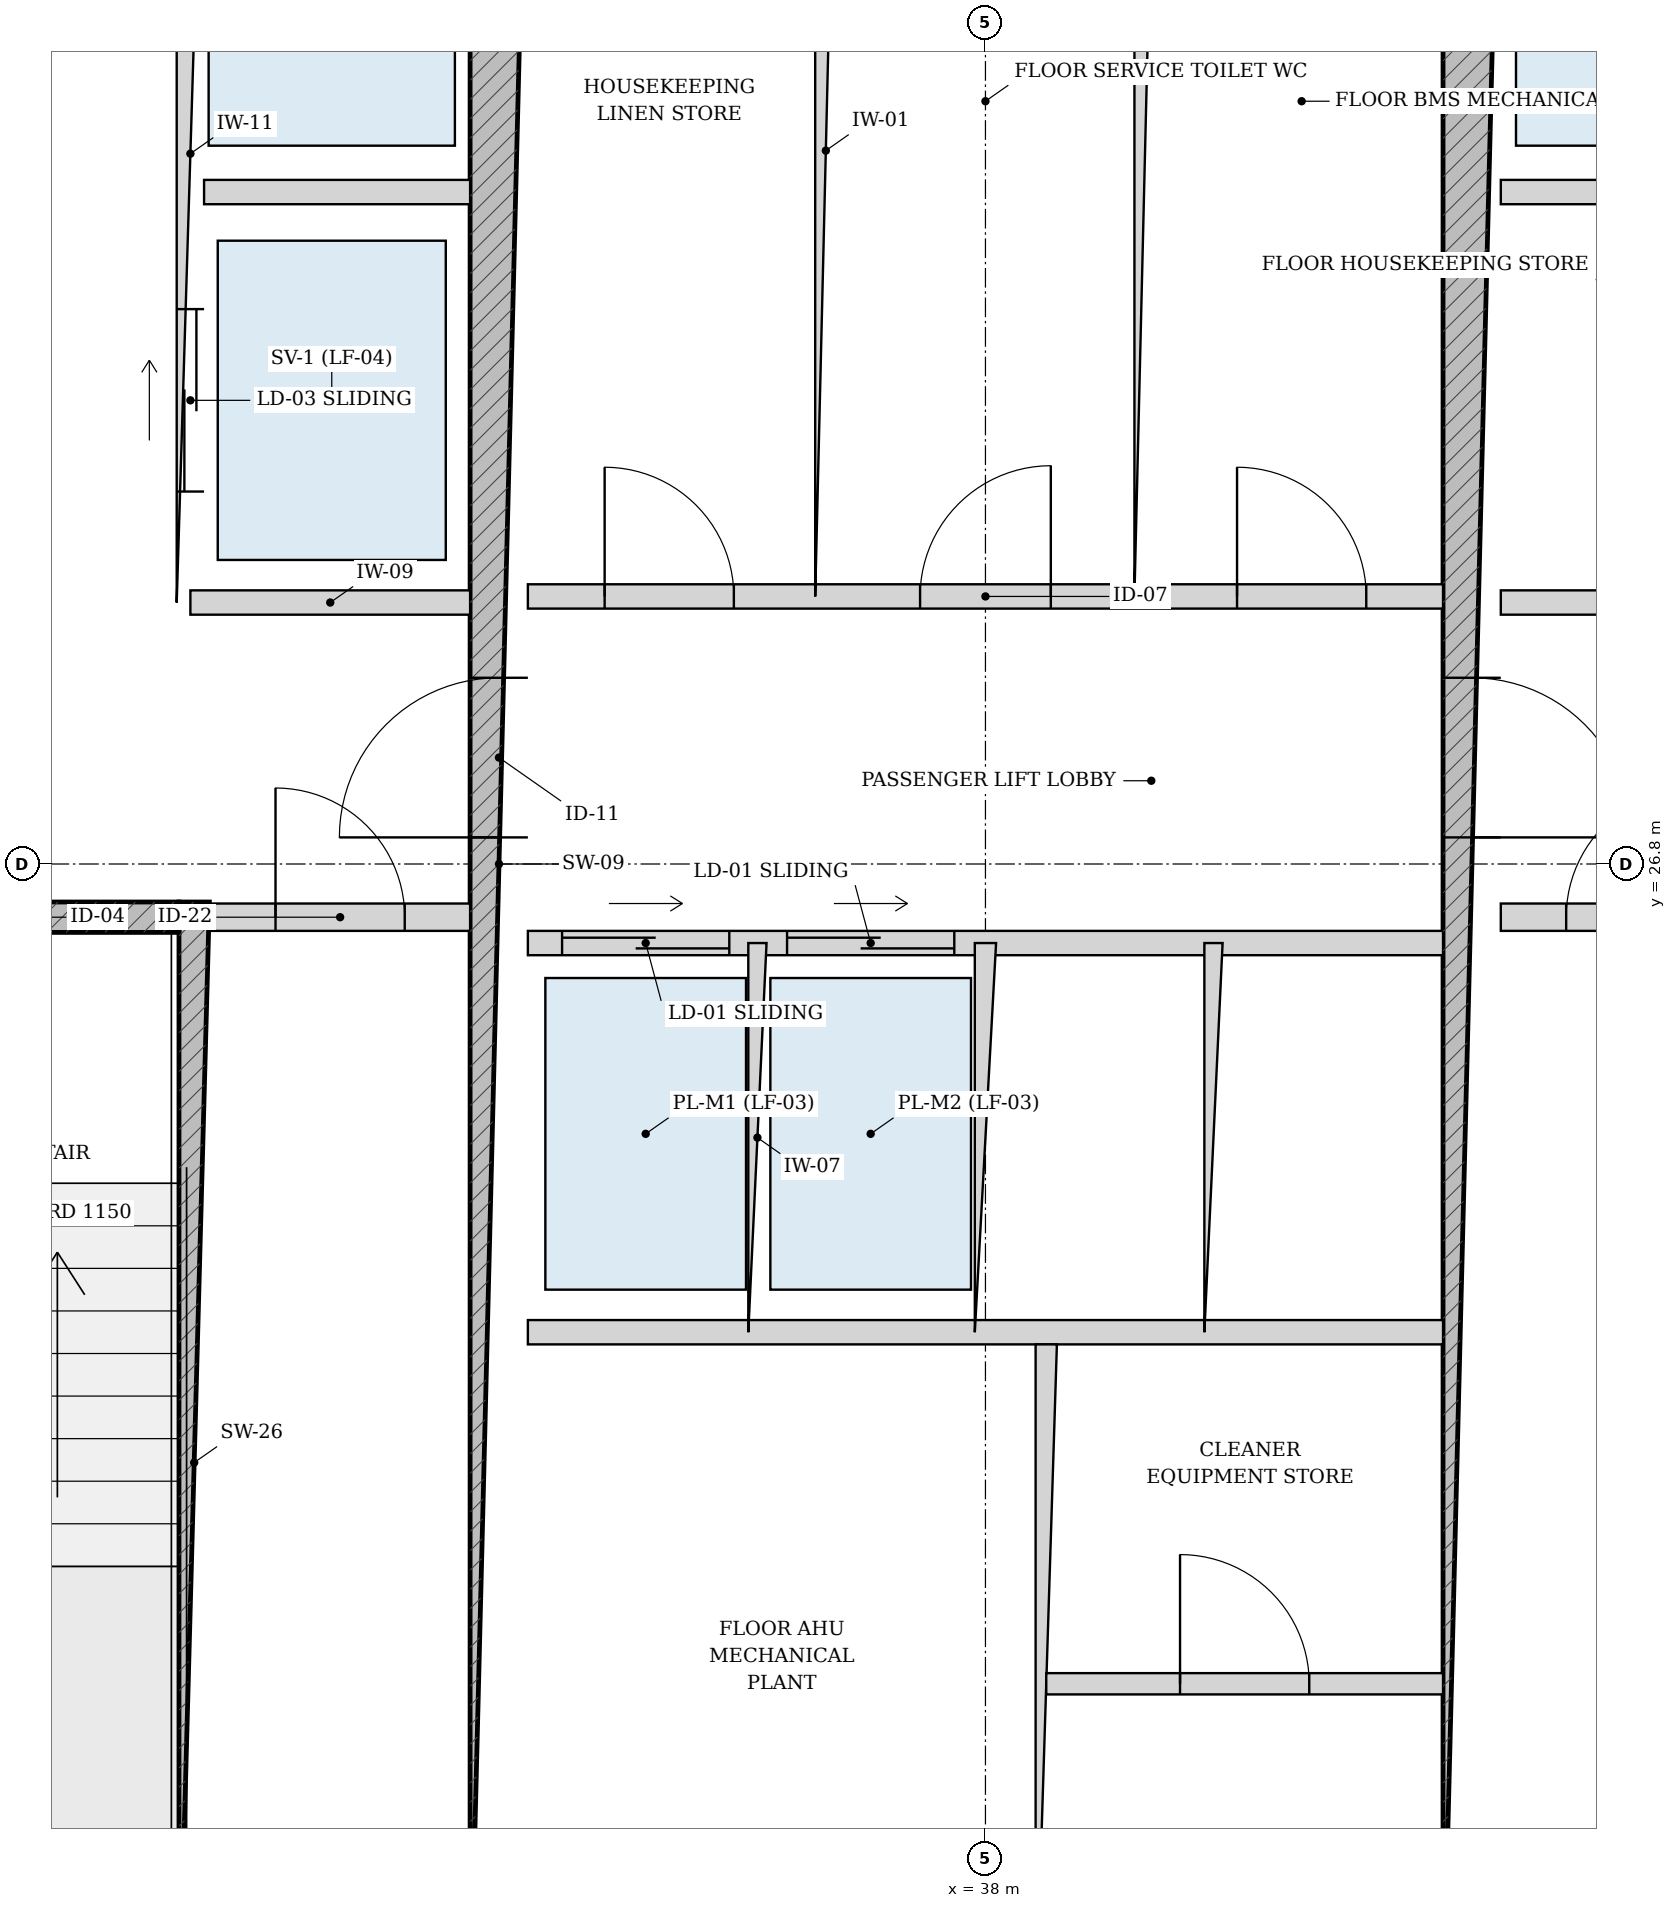
"""IFC4 building model, lengths in metres.
Left out: names, types, materials, properties, quantities, classifications, styles, units other than length and angle.
Written with IfcOpenShell. Run it as: python <this file> out.ifc"""

import sys

from ifc_helpers import new_model, si_unit, direction, frame, frame_2d, origin, place, context, subcontext, project, spatial, rectangle, extrude, source, transform, mapped, element, fill, save


model = new_model("IFC4")
c1 = context("Model", 3, precision=1e-05, world=origin(), true_north=direction((-0.2419218956, 0.970295726276)))
c2 = subcontext(c1, "Body", "Model", "MODEL_VIEW")
j1 = project(units=[si_unit("LENGTHUNIT", "METRE"), si_unit("PLANEANGLEUNIT", "RADIAN")], contexts=[c1])
p1 = place(None, origin())
s1 = spatial("IfcSite", under=j1, at=p1, CompositionType="ELEMENT")
p2 = place(p1, origin())
s2 = spatial("IfcBuilding", under=s1, at=p2, CompositionType="ELEMENT")
p3 = place(p2, frame((0.0, 0.0, 213.4)))
s3 = spatial("IfcBuildingStorey", under=s2, at=p3, CompositionType="ELEMENT", Elevation=213.4)
p4 = place(p3, frame((32.795, 19.175, 0.0), z_axis=(0.0, 0.0, 1.0), x_axis=(0.0, 1.0, 0.0)))
e1 = element("IfcWall", 1, at=p4, inside=s3, PredefinedType="SOLIDWALL", context=c2, shape_type="SweptSolid", body=[
    extrude(rectangle(XDim=7.375, YDim=0.2, at=frame_2d((3.688, 0.0))), origin(), (0.0, 0.0, 1.0), 3.435),
])
p5 = place(p3, frame((29.375, 26.45, 0.0), z_axis=(0.0, 0.0, 1.0), x_axis=(1.0, 0.0, 0.0)))
e2 = element("IfcWall", 2, at=p5, inside=s3, PredefinedType="SOLIDWALL", context=c2, shape_type="SweptSolid", body=[
    extrude(rectangle(XDim=3.32, YDim=0.2, at=frame_2d((1.66, 0.0))), origin(), (0.0, 0.0, 1.0), 3.435),
])
p6 = place(p5, frame((1.185, 0.0, 0.0)))
e3 = element("IfcOpeningElement", 3, at=p6, cuts=e2, PredefinedType="OPENING", context=c2, shape_type="SweptSolid", body=[
    extrude(rectangle(XDim=0.95, YDim=2.15, at=frame_2d((0.475, 1.075))), frame((0.0, 0.11, 0.0), z_axis=(0.0, -1.0, 0.0), x_axis=(1.0, 0.0, 0.0)), (0.0, 0.0, 1.0), 0.22),
])
p7 = place(p3, frame((34.8, 19.175, 0.0), z_axis=(0.0, 0.0, 1.0), x_axis=(0.0, 1.0, 0.0)))
e4 = element("IfcWall", 4, at=p7, inside=s3, PredefinedType="SHEAR", context=c2, shape_type="SweptSolid", body=[
    extrude(rectangle(XDim=15.25, YDim=0.38, at=frame_2d((7.625, 0.0))), origin(), (0.0, 0.0, 1.0), 3.435),
])
p8 = place(p7, frame((7.8, 0.0, 0.0)))
e5 = element("IfcOpeningElement", 5, at=p8, cuts=e4, PredefinedType="OPENING", context=c2, shape_type="SweptSolid", body=[
    extrude(rectangle(XDim=1.05, YDim=2.15, at=frame_2d((0.525, 1.075))), frame((0.0, 0.2, 0.0), z_axis=(0.0, -1.0, 0.0), x_axis=(1.0, 0.0, 0.0)), (0.0, 0.0, 1.0), 0.4),
])
p9 = place(p3, frame((41.2, 19.175, 0.0), z_axis=(0.0, 0.0, 1.0), x_axis=(0.0, 1.0, 0.0)))
e6 = element("IfcWall", 6, at=p9, inside=s3, PredefinedType="SHEAR", context=c2, shape_type="SweptSolid", body=[
    extrude(rectangle(XDim=15.25, YDim=0.38, at=frame_2d((7.625, 0.0))), origin(), (0.0, 0.0, 1.0), 3.435),
])
p10 = place(p9, frame((7.8, 0.0, 0.0)))
e7 = element("IfcOpeningElement", 7, at=p10, cuts=e6, PredefinedType="OPENING", context=c2, shape_type="SweptSolid", body=[
    extrude(rectangle(XDim=1.05, YDim=2.15, at=frame_2d((0.525, 1.075))), frame((0.0, 0.2, 0.0), z_axis=(0.0, -1.0, 0.0), x_axis=(1.0, 0.0, 0.0)), (0.0, 0.0, 1.0), 0.4),
])
p11 = place(p3, frame((32.9, 26.45, 0.0), z_axis=(0.0, 0.0, 1.0), x_axis=(1.0, 0.0, 0.0)))
e8 = element("IfcWall", 8, at=p11, inside=s3, PredefinedType="PARTITIONING", context=c2, shape_type="SweptSolid", body=[
    extrude(rectangle(XDim=1.71, YDim=0.18, at=frame_2d((0.855, 0.0))), origin(), (0.0, 0.0, 1.0), 3.435),
])
p12 = place(p11, frame((0.43, 0.0, 0.0)))
e9 = element("IfcOpeningElement", 9, at=p12, cuts=e8, PredefinedType="OPENING", context=c2, shape_type="SweptSolid", body=[
    extrude(rectangle(XDim=0.85, YDim=2.1, at=frame_2d((0.425, 1.05))), frame((0.0, 0.1, 0.0), z_axis=(0.0, -1.0, 0.0), x_axis=(1.0, 0.0, 0.0)), (0.0, 0.0, 1.0), 0.2),
])
p13 = place(p3, frame((41.39, 26.45, 0.0), z_axis=(0.0, 0.0, 1.0), x_axis=(1.0, 0.0, 0.0)))
e10 = element("IfcWall", 10, at=p13, inside=s3, PredefinedType="PARTITIONING", context=c2, shape_type="SweptSolid", body=[
    extrude(rectangle(XDim=1.71, YDim=0.18, at=frame_2d((0.855, 0.0))), origin(), (0.0, 0.0, 1.0), 3.435),
])
p14 = place(p13, frame((0.43, 0.0, 0.0)))
e11 = element("IfcOpeningElement", 11, at=p14, cuts=e10, PredefinedType="OPENING", context=c2, shape_type="SweptSolid", body=[
    extrude(rectangle(XDim=0.85, YDim=2.1, at=frame_2d((0.425, 1.05))), frame((0.0, 0.1, 0.0), z_axis=(0.0, -1.0, 0.0), x_axis=(1.0, 0.0, 0.0)), (0.0, 0.0, 1.0), 0.2),
])
p15 = place(p3, frame((32.77, 28.52, 0.0), z_axis=(0.0, 0.0, 1.0), x_axis=(0.0, 1.0, 0.0)))
e12 = element("IfcWall", 12, at=p15, inside=s3, PredefinedType="PARTITIONING", context=c2, shape_type="SweptSolid", body=[
    extrude(rectangle(XDim=5.905, YDim=0.18, at=frame_2d((2.953, 0.0))), origin(), (0.0, 0.0, 1.0), 3.435),
])
p16 = place(p15, frame((3.655, 0.0, 0.0)))
e13 = element("IfcOpeningElement", 13, at=p16, cuts=e12, PredefinedType="OPENING", context=c2, shape_type="SweptSolid", body=[
    extrude(rectangle(XDim=1.15, YDim=2.2, at=frame_2d((0.575, 1.1))), frame((0.0, 0.1, 0.0), z_axis=(0.0, -1.0, 0.0), x_axis=(1.0, 0.0, 0.0)), (0.0, 0.0, 1.0), 0.2),
])
p17 = place(p15, frame((0.73, 0.0, 0.0)))
e14 = element("IfcOpeningElement", 14, at=p17, cuts=e12, PredefinedType="OPENING", context=c2, shape_type="SweptSolid", body=[
    extrude(rectangle(XDim=1.2, YDim=2.25, at=frame_2d((0.6, 1.125))), frame((0.0, 0.1, 0.0), z_axis=(0.0, -1.0, 0.0), x_axis=(1.0, 0.0, 0.0)), (0.0, 0.0, 1.0), 0.2),
])
p18 = place(p3, frame((32.86, 31.22, 0.0), z_axis=(0.0, 0.0, 1.0), x_axis=(1.0, 0.0, 0.0)))
e15 = element("IfcWall", 15, at=p18, inside=s3, PredefinedType="PARTITIONING", context=c2, shape_type="SweptSolid", body=[
    extrude(rectangle(XDim=1.75, YDim=0.16, at=frame_2d((0.875, 0.0))), origin(), (0.0, 0.0, 1.0), 3.435),
])
p19 = place(p3, frame((32.77, 28.52, 0.0), z_axis=(0.0, 0.0, 1.0), x_axis=(1.0, 0.0, 0.0)))
e16 = element("IfcWall", 16, at=p19, inside=s3, PredefinedType="PARTITIONING", context=c2, shape_type="SweptSolid", body=[
    extrude(rectangle(XDim=1.84, YDim=0.16, at=frame_2d((0.92, 0.0))), origin(), (0.0, 0.0, 1.0), 3.435),
])
p20 = place(p3, frame((41.39, 31.22, 0.0), z_axis=(0.0, 0.0, 1.0), x_axis=(1.0, 0.0, 0.0)))
e17 = element("IfcWall", 17, at=p20, inside=s3, PredefinedType="PARTITIONING", context=c2, shape_type="SweptSolid", body=[
    extrude(rectangle(XDim=1.75, YDim=0.16, at=frame_2d((0.875, 0.0))), origin(), (0.0, 0.0, 1.0), 3.435),
])
p21 = place(p3, frame((41.39, 28.52, 0.0), z_axis=(0.0, 0.0, 1.0), x_axis=(1.0, 0.0, 0.0)))
e18 = element("IfcWall", 18, at=p21, inside=s3, PredefinedType="PARTITIONING", context=c2, shape_type="SweptSolid", body=[
    extrude(rectangle(XDim=1.84, YDim=0.16, at=frame_2d((0.92, 0.0))), origin(), (0.0, 0.0, 1.0), 3.435),
])
p22 = place(p3, frame((34.99, 28.56, 0.0), z_axis=(0.0, 0.0, 1.0), x_axis=(1.0, 0.0, 0.0)))
e19 = element("IfcWall", 19, at=p22, inside=s3, PredefinedType="PARTITIONING", context=c2, shape_type="SweptSolid", body=[
    extrude(rectangle(XDim=6.02, YDim=0.16, at=frame_2d((3.01, 0.0))), origin(), (0.0, 0.0, 1.0), 3.435),
])
p23 = place(p22, frame((0.505, 0.0, 0.0)))
e20 = element("IfcOpeningElement", 20, at=p23, cuts=e19, PredefinedType="OPENING", context=c2, shape_type="SweptSolid", body=[
    extrude(rectangle(XDim=0.85, YDim=2.1, at=frame_2d((0.425, 1.05))), frame((0.0, 0.09, 0.0), z_axis=(0.0, -1.0, 0.0), x_axis=(1.0, 0.0, 0.0)), (0.0, 0.0, 1.0), 0.18),
])
p24 = place(p22, frame((2.58, 0.0, 0.0)))
e21 = element("IfcOpeningElement", 21, at=p24, cuts=e19, PredefinedType="OPENING", context=c2, shape_type="SweptSolid", body=[
    extrude(rectangle(XDim=0.86, YDim=2.1, at=frame_2d((0.43, 1.05))), frame((0.0, 0.09, 0.0), z_axis=(0.0, -1.0, 0.0), x_axis=(1.0, 0.0, 0.0)), (0.0, 0.0, 1.0), 0.18),
])
p25 = place(p22, frame((4.665, 0.0, 0.0)))
e22 = element("IfcOpeningElement", 22, at=p25, cuts=e19, PredefinedType="OPENING", context=c2, shape_type="SweptSolid", body=[
    extrude(rectangle(XDim=0.85, YDim=2.1, at=frame_2d((0.425, 1.05))), frame((0.0, 0.09, 0.0), z_axis=(0.0, -1.0, 0.0), x_axis=(1.0, 0.0, 0.0)), (0.0, 0.0, 1.0), 0.18),
])
for number, where, z_axis, x_axis in (
    (23, (36.95, 28.56, 0.0), (0.0, 0.0, 1.0), (0.0, 1.0, 0.0)),
    (24, (39.05, 28.56, 0.0), (0.0, 0.0, 1.0), (0.0, 1.0, 0.0)),
):
    element("IfcWall", number, at=place(p3, frame(where, z_axis=z_axis, x_axis=x_axis)), inside=s3, PredefinedType="PARTITIONING", context=c2, shape_type="SweptSolid", body=[
        extrude(rectangle(XDim=5.865, YDim=0.14, at=frame_2d((2.933, 0.0))), origin(), (0.0, 0.0, 1.0), 3.435),
    ])
p26 = place(p3, frame((34.99, 26.28, 0.0), z_axis=(0.0, 0.0, 1.0), x_axis=(1.0, 0.0, 0.0)))
e25 = element("IfcWall", 25, at=p26, inside=s3, PredefinedType="PARTITIONING", context=c2, shape_type="SweptSolid", body=[
    extrude(rectangle(XDim=6.02, YDim=0.16, at=frame_2d((3.01, 0.0))), origin(), (0.0, 0.0, 1.0), 3.435),
])
p27 = place(p26, frame((0.225, 0.0, 0.0)))
e26 = element("IfcOpeningElement", 26, at=p27, cuts=e25, PredefinedType="OPENING", context=c2, shape_type="SweptSolid", body=[
    extrude(rectangle(XDim=1.1, YDim=2.2, at=frame_2d((0.55, 1.1))), frame((0.0, 0.09, 0.0), z_axis=(0.0, -1.0, 0.0), x_axis=(1.0, 0.0, 0.0)), (0.0, 0.0, 1.0), 0.18),
])
p28 = place(p26, frame((1.705, 0.0, 0.0)))
e27 = element("IfcOpeningElement", 27, at=p28, cuts=e25, PredefinedType="OPENING", context=c2, shape_type="SweptSolid", body=[
    extrude(rectangle(XDim=1.1, YDim=2.2, at=frame_2d((0.55, 1.1))), frame((0.0, 0.09, 0.0), z_axis=(0.0, -1.0, 0.0), x_axis=(1.0, 0.0, 0.0)), (0.0, 0.0, 1.0), 0.18),
])
p29 = place(p3, frame((34.99, 23.72, 0.0), z_axis=(0.0, 0.0, 1.0), x_axis=(1.0, 0.0, 0.0)))
e28 = element("IfcWall", 28, at=p29, inside=s3, PredefinedType="PARTITIONING", context=c2, shape_type="SweptSolid", body=[
    extrude(rectangle(XDim=6.02, YDim=0.16, at=frame_2d((3.01, 0.0))), origin(), (0.0, 0.0, 1.0), 3.435),
])
p30 = place(p3, frame((36.5, 23.72, 0.0), z_axis=(0.0, 0.0, 1.0), x_axis=(0.0, 1.0, 0.0)))
e29 = element("IfcWall", 29, at=p30, inside=s3, PredefinedType="PARTITIONING", context=c2, shape_type="SweptSolid", body=[
    extrude(rectangle(XDim=2.56, YDim=0.12, at=frame_2d((1.28, 0.0))), origin(), (0.0, 0.0, 1.0), 3.435),
])
p31 = place(p3, frame((38.0, 23.72, 0.0), z_axis=(0.0, 0.0, 1.0), x_axis=(0.0, 1.0, 0.0)))
e30 = element("IfcWall", 30, at=p31, inside=s3, PredefinedType="PARTITIONING", context=c2, shape_type="SweptSolid", body=[
    extrude(rectangle(XDim=2.56, YDim=0.14, at=frame_2d((1.28, 0.0))), origin(), (0.0, 0.0, 1.0), 3.435),
])
p32 = place(p3, frame((39.5, 23.72, 0.0), z_axis=(0.0, 0.0, 1.0), x_axis=(0.0, 1.0, 0.0)))
e31 = element("IfcWall", 31, at=p32, inside=s3, PredefinedType="PARTITIONING", context=c2, shape_type="SweptSolid", body=[
    extrude(rectangle(XDim=2.56, YDim=0.12, at=frame_2d((1.28, 0.0))), origin(), (0.0, 0.0, 1.0), 3.435),
])
p33 = place(p3, frame((38.4, 19.175, 0.0), z_axis=(0.0, 0.0, 1.0), x_axis=(0.0, 1.0, 0.0)))
e32 = element("IfcWall", 32, at=p33, inside=s3, PredefinedType="PARTITIONING", context=c2, shape_type="SweptSolid", body=[
    extrude(rectangle(XDim=4.465, YDim=0.14, at=frame_2d((2.232, 0.0))), origin(), (0.0, 0.0, 1.0), 3.435),
])
p34 = place(p3, frame((38.4, 21.407, 0.0), z_axis=(0.0, 0.0, 1.0), x_axis=(1.0, 0.0, 0.0)))
e33 = element("IfcWall", 33, at=p34, inside=s3, PredefinedType="PARTITIONING", context=c2, shape_type="SweptSolid", body=[
    extrude(rectangle(XDim=2.61, YDim=0.14, at=frame_2d((1.305, 0.0))), origin(), (0.0, 0.0, 1.0), 3.435),
])
p35 = place(p34, frame((0.88, 0.0, 0.0)))
e34 = element("IfcOpeningElement", 34, at=p35, cuts=e33, PredefinedType="OPENING", context=c2, shape_type="SweptSolid", body=[
    extrude(rectangle(XDim=0.85, YDim=2.1, at=frame_2d((0.425, 1.05))), frame((0.0, 0.08, 0.0), z_axis=(0.0, -1.0, 0.0), x_axis=(1.0, 0.0, 0.0)), (0.0, 0.0, 1.0), 0.16),
])
m1 = source(origin(), c2, "Body", "SweptSolid", [
    extrude(rectangle(XDim=1.05, YDim=2.15, at=frame_2d((0.525, 1.075))), frame((0.0, 0.025, 0.0), z_axis=(0.0, -1.0, 0.0), x_axis=(1.0, 0.0, 0.0)), (0.0, 0.0, 1.0), 0.05),
])
p36 = place(p8, origin())
e35 = element("IfcDoor", 35, at=p36, inside=s3, OperationType="SINGLE_SWING_LEFT", PredefinedType="DOOR", context=c2, shape_type="MappedRepresentation", body=[
    mapped(m1, transform((0.0, 0.0, 0.0), scale=1.0)),
])
fill(e5, e35)
p37 = place(p10, frame((1.05, 0.0, 0.0), z_axis=(0.0, 0.0, 1.0), x_axis=(-1.0, 0.0, 0.0)))
e36 = element("IfcDoor", 36, at=p37, inside=s3, OperationType="SINGLE_SWING_RIGHT", PredefinedType="DOOR", context=c2, shape_type="MappedRepresentation", body=[
    mapped(m1, transform((0.0, 0.0, 0.0), scale=1.0)),
])
fill(e7, e36)
m2 = source(origin(), c2, "Body", "SweptSolid", [
    extrude(rectangle(XDim=0.85, YDim=2.1, at=frame_2d((0.425, 1.05))), frame((0.0, 0.025, 0.0), z_axis=(0.0, -1.0, 0.0), x_axis=(1.0, 0.0, 0.0)), (0.0, 0.0, 1.0), 0.05),
])
p38 = place(p12, origin())
e37 = element("IfcDoor", 37, at=p38, inside=s3, OperationType="SINGLE_SWING_LEFT", PredefinedType="DOOR", context=c2, shape_type="MappedRepresentation", body=[
    mapped(m2, transform((0.0, 0.0, 0.0), scale=1.0)),
])
fill(e9, e37)
p39 = place(p14, origin())
e38 = element("IfcDoor", 38, at=p39, inside=s3, OperationType="SINGLE_SWING_RIGHT", PredefinedType="DOOR", context=c2, shape_type="MappedRepresentation", body=[
    mapped(m2, transform((0.0, 0.0, 0.0), scale=1.0)),
])
fill(e11, e38)
p40 = place(p23, origin())
e39 = element("IfcDoor", 39, at=p40, inside=s3, OperationType="SINGLE_SWING_LEFT", PredefinedType="DOOR", context=c2, shape_type="MappedRepresentation", body=[
    mapped(m2, transform((0.0, 0.0, 0.0), scale=1.0)),
])
fill(e20, e39)
m3 = source(origin(), c2, "Body", "SweptSolid", [
    extrude(rectangle(XDim=0.86, YDim=2.1, at=frame_2d((0.43, 1.05))), frame((0.0, 0.025, 0.0), z_axis=(0.0, -1.0, 0.0), x_axis=(1.0, 0.0, 0.0)), (0.0, 0.0, 1.0), 0.05),
])
p41 = place(p24, origin())
e40 = element("IfcDoor", 40, at=p41, inside=s3, OperationType="SINGLE_SWING_RIGHT", PredefinedType="DOOR", context=c2, shape_type="MappedRepresentation", body=[
    mapped(m3, transform((0.0, 0.0, 0.0), scale=1.0)),
])
fill(e21, e40)
p42 = place(p25, origin())
e41 = element("IfcDoor", 41, at=p42, inside=s3, OperationType="SINGLE_SWING_LEFT", PredefinedType="DOOR", context=c2, shape_type="MappedRepresentation", body=[
    mapped(m2, transform((0.0, 0.0, 0.0), scale=1.0)),
])
fill(e22, e41)
p43 = place(p35, origin())
e42 = element("IfcDoor", 42, at=p43, inside=s3, OperationType="SINGLE_SWING_LEFT", PredefinedType="DOOR", context=c2, shape_type="MappedRepresentation", body=[
    mapped(m2, transform((0.0, 0.0, 0.0), scale=1.0)),
])
fill(e34, e42)
m4 = source(origin(), c2, "Body", "SweptSolid", [
    extrude(rectangle(XDim=1.2, YDim=2.25, at=frame_2d((0.6, 1.125))), frame((0.0, 0.025, 0.0), z_axis=(0.0, -1.0, 0.0), x_axis=(1.0, 0.0, 0.0)), (0.0, 0.0, 1.0), 0.05),
])
p44 = place(p17, origin())
e43 = element("IfcDoor", 43, at=p44, inside=s3, OperationType="DOUBLE_DOOR_SLIDING", PredefinedType="DOOR", context=c2, shape_type="MappedRepresentation", body=[
    mapped(m4, transform((0.0, 0.0, 0.0), scale=1.0)),
])
fill(e14, e43)
m5 = source(origin(), c2, "Body", "SweptSolid", [
    extrude(rectangle(XDim=1.1, YDim=2.2, at=frame_2d((0.55, 1.1))), frame((0.0, 0.025, 0.0), z_axis=(0.0, -1.0, 0.0), x_axis=(1.0, 0.0, 0.0)), (0.0, 0.0, 1.0), 0.05),
])
p45 = place(p27, origin())
e44 = element("IfcDoor", 44, at=p45, inside=s3, OperationType="DOUBLE_DOOR_SLIDING", PredefinedType="DOOR", context=c2, shape_type="MappedRepresentation", body=[
    mapped(m5, transform((0.0, 0.0, 0.0), scale=1.0)),
])
fill(e26, e44)
p46 = place(p28, origin())
e45 = element("IfcDoor", 45, at=p46, inside=s3, OperationType="DOUBLE_DOOR_SLIDING", PredefinedType="DOOR", context=c2, shape_type="MappedRepresentation", body=[
    mapped(m5, transform((0.0, 0.0, 0.0), scale=1.0)),
])
fill(e27, e45)
save(model, sys.argv[1])
